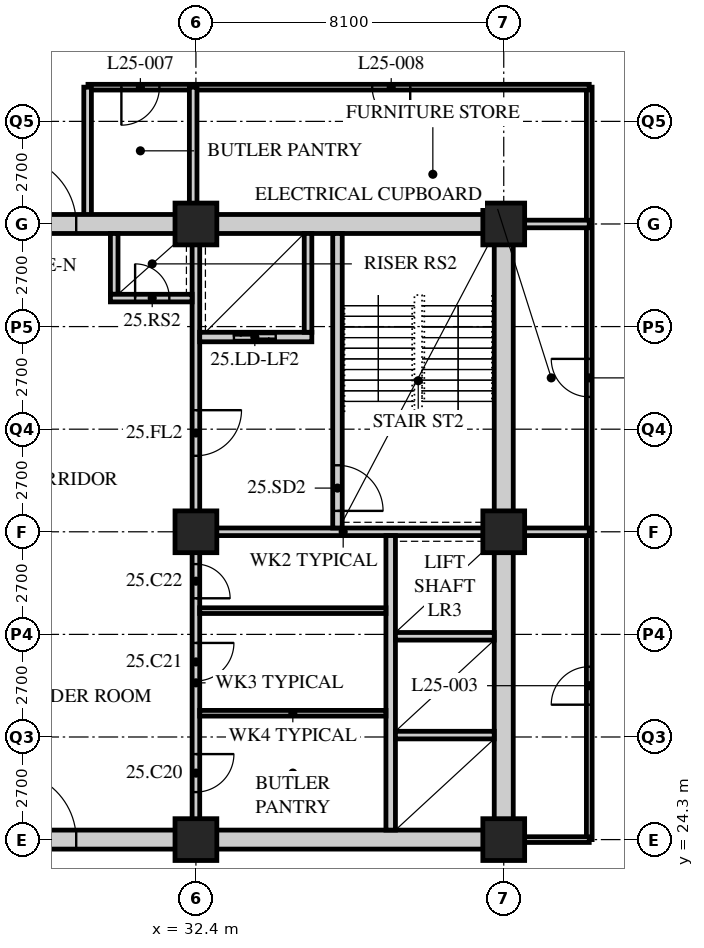
"""IFC4 building model, lengths in metres.
Left out: names, types, materials, properties, quantities, classifications, styles, units other than length and angle.
Written with IfcOpenShell. Run it as: python <this file> out.ifc"""

import sys

from ifc_helpers import new_model, si_unit, direction, frame, frame_2d, origin, origin_2d, place, context, subcontext, project, spatial, rectangle, hollow_rectangle, extrude, element, fill, save


model = new_model("IFC4")
c1 = context("Model", 3, precision=1e-05, world=origin(), true_north=direction((0.0, 1.0)))
c2 = subcontext(c1, "Body", "Model", "MODEL_VIEW")
j1 = project(units=[si_unit("LENGTHUNIT", "METRE"), si_unit("PLANEANGLEUNIT", "RADIAN")], contexts=[c1])
p1 = place(None, origin())
s1 = spatial("IfcSite", under=j1, at=p1, CompositionType="ELEMENT")
p2 = place(p1, origin())
s2 = spatial("IfcBuilding", under=s1, at=p2, CompositionType="ELEMENT")
p3 = place(p2, frame((0.0, 0.0, 103.4)))
s3 = spatial("IfcBuildingStorey", under=s2, at=p3, CompositionType="ELEMENT", Elevation=103.4)
for number, where, z_axis, x_axis in (
    (1, (32.4, 24.3, 0.0), (0.0, 0.0, 1.0), (1.0, 0.0, 0.0)),
    (2, (32.4, 32.4, 0.0), (0.0, 0.0, 1.0), (1.0, 0.0, 0.0)),
    (3, (32.4, 40.5, 0.0), (0.0, 0.0, 1.0), (1.0, 0.0, 0.0)),
    (4, (40.5, 24.3, 0.0), (0.0, 0.0, 1.0), (1.0, 0.0, 0.0)),
    (5, (40.5, 32.4, 0.0), (0.0, 0.0, 1.0), (1.0, 0.0, 0.0)),
    (6, (40.5, 40.5, 0.0), (0.0, 0.0, 1.0), (1.0, 0.0, 0.0)),
):
    element("IfcColumn", number, at=place(p3, frame(where, z_axis=z_axis, x_axis=x_axis)), inside=s3, PredefinedType="COLUMN", context=c2, shape_type="SweptSolid", body=[
        extrude(hollow_rectangle(XDim=1.1, YDim=1.1, WallThickness=0.1, at=origin_2d()), origin(), (0.0, 0.0, 1.0), 3.4),
    ])
p4 = place(p3, frame((42.75, 24.3, 0.0), z_axis=(0.0, 0.0, 1.0), x_axis=(0.0, 1.0, 0.0)))
e7 = element("IfcWall", 7, at=p4, inside=s3, PredefinedType="PARTITIONING", context=c2, shape_type="SweptSolid", body=[
    extrude(rectangle(XDim=19.8, YDim=0.15, at=frame_2d((9.9, 0.0))), origin(), (0.0, 0.0, 1.0), 3.19),
])
p5 = place(p4, frame((3.55, 0.0, 0.0)))
e8 = element("IfcOpeningElement", 8, at=p5, cuts=e7, PredefinedType="OPENING", context=c2, shape_type="SweptSolid", body=[
    extrude(rectangle(XDim=1.0, YDim=2.1, at=frame_2d((0.5, 1.05))), frame((0.0, 0.085, 0.0), z_axis=(0.0, -1.0, 0.0), x_axis=(1.0, 0.0, 0.0)), (0.0, 0.0, 1.0), 0.17),
])
p6 = place(p4, frame((11.65, 0.0, 0.0)))
e9 = element("IfcOpeningElement", 9, at=p6, cuts=e7, PredefinedType="OPENING", context=c2, shape_type="SweptSolid", body=[
    extrude(rectangle(XDim=1.0, YDim=2.1, at=frame_2d((0.5, 1.05))), frame((0.0, 0.085, 0.0), z_axis=(0.0, -1.0, 0.0), x_axis=(1.0, 0.0, 0.0)), (0.0, 0.0, 1.0), 0.17),
])
p7 = place(p3, frame((42.75, 44.1, 0.0), z_axis=(0.0, 0.0, 1.0), x_axis=(-1.0, 0.0, 0.0)))
e10 = element("IfcWall", 10, at=p7, inside=s3, PredefinedType="PARTITIONING", context=c2, shape_type="SweptSolid", body=[
    extrude(rectangle(XDim=13.19, YDim=0.15, at=frame_2d((6.595, 0.0))), origin(), (0.0, 0.0, 1.0), 3.19),
])
p8 = place(p7, frame((11.311, 0.0, 0.0)))
e11 = element("IfcOpeningElement", 11, at=p8, cuts=e10, PredefinedType="OPENING", context=c2, shape_type="SweptSolid", body=[
    extrude(rectangle(XDim=1.0, YDim=2.1, at=frame_2d((0.5, 1.05))), frame((0.0, 0.085, 0.0), z_axis=(0.0, -1.0, 0.0), x_axis=(1.0, 0.0, 0.0)), (0.0, 0.0, 1.0), 0.17),
])
p9 = place(p7, frame((4.711, 0.0, 0.0)))
e12 = element("IfcOpeningElement", 12, at=p9, cuts=e10, PredefinedType="OPENING", context=c2, shape_type="SweptSolid", body=[
    extrude(rectangle(XDim=1.0, YDim=2.1, at=frame_2d((0.5, 1.05))), frame((0.0, 0.085, 0.0), z_axis=(0.0, -1.0, 0.0), x_axis=(1.0, 0.0, 0.0)), (0.0, 0.0, 1.0), 0.17),
])
p10 = place(p3, frame((40.7, 24.3, 0.0), z_axis=(0.0, 0.0, 1.0), x_axis=(1.0, 0.0, 0.0)))
e13 = element("IfcWall", 13, at=p10, inside=s3, PredefinedType="PARTITIONING", context=c2, shape_type="SweptSolid", body=[
    extrude(rectangle(XDim=2.05, YDim=0.15, at=frame_2d((1.025, 0.0))), origin(), (0.0, 0.0, 1.0), 3.19),
])
p11 = place(p3, frame((40.5, 32.4, 0.0), z_axis=(0.0, 0.0, 1.0), x_axis=(1.0, 0.0, 0.0)))
e14 = element("IfcWall", 14, at=p11, inside=s3, PredefinedType="SOLIDWALL", context=c2, shape_type="SweptSolid", body=[
    extrude(rectangle(XDim=2.25, YDim=0.2, at=frame_2d((1.125, 0.0))), origin(), (0.0, 0.0, 1.0), 3.19),
])
p12 = place(p3, frame((32.328, 44.1, 0.0), z_axis=(0.0, 0.0, 1.0), x_axis=(0.0, -1.0, 0.0)))
e15 = element("IfcWall", 15, at=p12, inside=s3, PredefinedType="SOLIDWALL", context=c2, shape_type="SweptSolid", body=[
    extrude(rectangle(XDim=3.6, YDim=0.2, at=frame_2d((1.8, 0.0))), origin(), (0.0, 0.0, 1.0), 2.578),
])
p13 = place(p3, frame((29.55, 40.5, 0.0), z_axis=(0.0, 0.0, 1.0), x_axis=(0.0, 1.0, 0.0)))
e16 = element("IfcWall", 16, at=p13, inside=s3, PredefinedType="SOLIDWALL", context=c2, shape_type="SweptSolid", body=[
    extrude(rectangle(XDim=3.6, YDim=0.2, at=frame_2d((1.8, 0.0))), origin(), (0.0, 0.0, 1.0), 3.19),
])
p14 = place(p3, frame((40.5, 40.5, 0.0), z_axis=(0.0, 0.0, 1.0), x_axis=(1.0, 0.0, 0.0)))
e17 = element("IfcWall", 17, at=p14, inside=s3, PredefinedType="SOLIDWALL", context=c2, shape_type="SweptSolid", body=[
    extrude(rectangle(XDim=2.25, YDim=0.2, at=frame_2d((1.125, 0.0))), origin(), (0.0, 0.0, 1.0), 3.19),
])
p15 = place(p3, frame((15.95, 24.3, 0.0), z_axis=(0.0, 0.0, 1.0), x_axis=(1.0, 0.0, 0.0)))
e18 = element("IfcWall", 18, at=p15, inside=s3, PredefinedType="SOLIDWALL", context=c2, shape_type="SweptSolid", body=[
    extrude(rectangle(XDim=24.8, YDim=0.5, at=frame_2d((12.4, 0.0))), origin(), (0.0, 0.0, 1.0), 2.54),
])
p16 = place(p15, frame((11.5, 0.0, 0.0)))
e19 = element("IfcOpeningElement", 19, at=p16, cuts=e18, PredefinedType="OPENING", context=c2, shape_type="SweptSolid", body=[
    extrude(rectangle(XDim=1.8, YDim=2.4, at=frame_2d((0.9, 1.2))), frame((0.0, 0.26, 0.0), z_axis=(0.0, -1.0, 0.0), x_axis=(1.0, 0.0, 0.0)), (0.0, 0.0, 1.0), 0.52),
])
p17 = place(p3, frame((15.95, 40.5, 0.0), z_axis=(0.0, 0.0, 1.0), x_axis=(1.0, 0.0, 0.0)))
e20 = element("IfcWall", 20, at=p17, inside=s3, PredefinedType="SOLIDWALL", context=c2, shape_type="SweptSolid", body=[
    extrude(rectangle(XDim=24.8, YDim=0.5, at=frame_2d((12.4, 0.0))), origin(), (0.0, 0.0, 1.0), 2.54),
])
p18 = place(p17, frame((11.5, 0.0, 0.0)))
e21 = element("IfcOpeningElement", 21, at=p18, cuts=e20, PredefinedType="OPENING", context=c2, shape_type="SweptSolid", body=[
    extrude(rectangle(XDim=1.8, YDim=2.4, at=frame_2d((0.9, 1.2))), frame((0.0, 0.26, 0.0), z_axis=(0.0, -1.0, 0.0), x_axis=(1.0, 0.0, 0.0)), (0.0, 0.0, 1.0), 0.52),
])
p19 = place(p3, frame((40.5, 24.55, 0.0), z_axis=(0.0, 0.0, 1.0), x_axis=(0.0, 1.0, 0.0)))
e22 = element("IfcWall", 22, at=p19, inside=s3, PredefinedType="SOLIDWALL", context=c2, shape_type="SweptSolid", body=[
    extrude(rectangle(XDim=15.7, YDim=0.5, at=frame_2d((7.85, 0.0))), origin(), (0.0, 0.0, 1.0), 2.578),
])
p20 = place(p3, frame((32.3, 32.4, 0.0), z_axis=(0.0, 0.0, 1.0), x_axis=(1.0, 0.0, 0.0)))
e23 = element("IfcWall", 23, at=p20, inside=s3, PredefinedType="SOLIDWALL", context=c2, shape_type="SweptSolid", body=[
    extrude(rectangle(XDim=7.95, YDim=0.2, at=frame_2d((3.975, 0.0))), origin(), (0.0, 0.0, 1.0), 2.578),
])
p21 = place(p3, frame((32.4, 32.5, 0.0), z_axis=(0.0, 0.0, 1.0), x_axis=(0.0, 1.0, 0.0)))
e24 = element("IfcWall", 24, at=p21, inside=s3, PredefinedType="SOLIDWALL", context=c2, shape_type="SweptSolid", body=[
    extrude(rectangle(XDim=7.75, YDim=0.2, at=frame_2d((3.875, 0.0))), origin(), (0.0, 0.0, 1.0), 2.578),
])
p22 = place(p21, frame((1.9, 0.0, 0.0)))
e25 = element("IfcOpeningElement", 25, at=p22, cuts=e24, PredefinedType="OPENING", context=c2, shape_type="SweptSolid", body=[
    extrude(rectangle(XDim=1.2, YDim=2.1, at=frame_2d((0.6, 1.05))), frame((0.0, 0.11, 0.0), z_axis=(0.0, -1.0, 0.0), x_axis=(1.0, 0.0, 0.0)), (0.0, 0.0, 1.0), 0.22),
])
p23 = place(p3, frame((37.525, 24.55, 0.0), z_axis=(0.0, 0.0, 1.0), x_axis=(0.0, 1.0, 0.0)))
e26 = element("IfcWall", 26, at=p23, inside=s3, PredefinedType="SOLIDWALL", context=c2, shape_type="SweptSolid", body=[
    extrude(rectangle(XDim=7.75, YDim=0.25, at=frame_2d((3.875, 0.0))), origin(), (0.0, 0.0, 1.0), 3.19),
])
for number, where, z_axis, x_axis in (
    (27, (37.65, 27.05, 0.0), (0.0, 0.0, 1.0), (1.0, 0.0, 0.0)),
    (28, (37.65, 29.65, 0.0), (0.0, 0.0, 1.0), (1.0, 0.0, 0.0)),
):
    element("IfcWall", number, at=place(p3, frame(where, z_axis=z_axis, x_axis=x_axis)), inside=s3, PredefinedType="SOLIDWALL", context=c2, shape_type="SweptSolid", body=[
        extrude(rectangle(XDim=2.6, YDim=0.2, at=frame_2d((1.3, 0.0))), origin(), (0.0, 0.0, 1.0), 3.19),
    ])
p24 = place(p3, frame((36.125, 32.5, 0.0), z_axis=(0.0, 0.0, 1.0), x_axis=(0.0, 1.0, 0.0)))
e29 = element("IfcWall", 29, at=p24, inside=s3, PredefinedType="SOLIDWALL", context=c2, shape_type="SweptSolid", body=[
    extrude(rectangle(XDim=7.75, YDim=0.25, at=frame_2d((3.875, 0.0))), origin(), (0.0, 0.0, 1.0), 3.19),
])
p25 = place(p24, frame((0.45, 0.0, 0.0)))
e30 = element("IfcOpeningElement", 30, at=p25, cuts=e29, PredefinedType="OPENING", context=c2, shape_type="SweptSolid", body=[
    extrude(rectangle(XDim=1.2, YDim=2.1, at=frame_2d((0.6, 1.05))), frame((0.0, 0.135, 0.0), z_axis=(0.0, -1.0, 0.0), x_axis=(1.0, 0.0, 0.0)), (0.0, 0.0, 1.0), 0.27),
])
p26 = place(p3, frame((32.5, 37.525, 0.0), z_axis=(0.0, 0.0, 1.0), x_axis=(1.0, 0.0, 0.0)))
e31 = element("IfcWall", 31, at=p26, inside=s3, PredefinedType="SOLIDWALL", context=c2, shape_type="SweptSolid", body=[
    extrude(rectangle(XDim=2.95, YDim=0.25, at=frame_2d((1.475, 0.0))), origin(), (0.0, 0.0, 1.0), 3.19),
])
p27 = place(p26, frame((0.9, 0.0, 0.0)))
e32 = element("IfcOpeningElement", 32, at=p27, cuts=e31, PredefinedType="OPENING", context=c2, shape_type="SweptSolid", body=[
    extrude(rectangle(XDim=1.1, YDim=2.4, at=frame_2d((0.55, 1.2))), frame((0.0, 0.135, 0.0), z_axis=(0.0, -1.0, 0.0), x_axis=(1.0, 0.0, 0.0)), (0.0, 0.0, 1.0), 0.27),
])
p28 = place(p3, frame((35.35, 37.65, 0.0), z_axis=(0.0, 0.0, 1.0), x_axis=(0.0, 1.0, 0.0)))
e33 = element("IfcWall", 33, at=p28, inside=s3, PredefinedType="SOLIDWALL", context=c2, shape_type="SweptSolid", body=[
    extrude(rectangle(XDim=2.6, YDim=0.2, at=frame_2d((1.3, 0.0))), origin(), (0.0, 0.0, 1.0), 3.19),
])
p29 = place(p3, frame((30.25, 38.65, 0.0), z_axis=(0.0, 0.0, 1.0), x_axis=(0.0, 1.0, 0.0)))
e34 = element("IfcWall", 34, at=p29, inside=s3, PredefinedType="SOLIDWALL", context=c2, shape_type="SweptSolid", body=[
    extrude(rectangle(XDim=1.6, YDim=0.2, at=frame_2d((0.8, 0.0))), origin(), (0.0, 0.0, 1.0), 3.19),
])
p30 = place(p3, frame((30.15, 38.55, 0.0), z_axis=(0.0, 0.0, 1.0), x_axis=(1.0, 0.0, 0.0)))
e35 = element("IfcWall", 35, at=p30, inside=s3, PredefinedType="SOLIDWALL", context=c2, shape_type="SweptSolid", body=[
    extrude(rectangle(XDim=2.15, YDim=0.2, at=frame_2d((1.075, 0.0))), origin(), (0.0, 0.0, 1.0), 3.19),
])
p31 = place(p30, frame((0.65, 0.0, 0.0)))
e36 = element("IfcOpeningElement", 36, at=p31, cuts=e35, PredefinedType="OPENING", context=c2, shape_type="SweptSolid", body=[
    extrude(rectangle(XDim=0.9, YDim=2.1, at=frame_2d((0.45, 1.05))), frame((0.0, 0.11, 0.0), z_axis=(0.0, -1.0, 0.0), x_axis=(1.0, 0.0, 0.0)), (0.0, 0.0, 1.0), 0.22),
])
p32 = place(p3, frame((32.4, 24.55, 0.0), z_axis=(0.0, 0.0, 1.0), x_axis=(0.0, 1.0, 0.0)))
e37 = element("IfcWall", 37, at=p32, inside=s3, PredefinedType="PARTITIONING", context=c2, shape_type="SweptSolid", body=[
    extrude(rectangle(XDim=7.75, YDim=0.2, at=frame_2d((3.875, 0.0))), origin(), (0.0, 0.0, 1.0), 2.578),
])
p33 = place(p32, frame((1.0, 0.0, 0.0)))
e38 = element("IfcOpeningElement", 38, at=p33, cuts=e37, PredefinedType="OPENING", context=c2, shape_type="SweptSolid", body=[
    extrude(rectangle(XDim=1.0, YDim=2.1, at=frame_2d((0.5, 1.05))), frame((0.0, 0.11, 0.0), z_axis=(0.0, -1.0, 0.0), x_axis=(1.0, 0.0, 0.0)), (0.0, 0.0, 1.0), 0.22),
])
p34 = place(p32, frame((3.925, 0.0, 0.0)))
e39 = element("IfcOpeningElement", 39, at=p34, cuts=e37, PredefinedType="OPENING", context=c2, shape_type="SweptSolid", body=[
    extrude(rectangle(XDim=1.0, YDim=2.1, at=frame_2d((0.5, 1.05))), frame((0.0, 0.11, 0.0), z_axis=(0.0, -1.0, 0.0), x_axis=(1.0, 0.0, 0.0)), (0.0, 0.0, 1.0), 0.22),
])
p35 = place(p32, frame((6.1, 0.0, 0.0)))
e40 = element("IfcOpeningElement", 40, at=p35, cuts=e37, PredefinedType="OPENING", context=c2, shape_type="SweptSolid", body=[
    extrude(rectangle(XDim=0.9, YDim=2.1, at=frame_2d((0.45, 1.05))), frame((0.0, 0.11, 0.0), z_axis=(0.0, -1.0, 0.0), x_axis=(1.0, 0.0, 0.0)), (0.0, 0.0, 1.0), 0.22),
])
for number, where, z_axis, x_axis in (
    (41, (32.5, 27.625, 0.0), (0.0, 0.0, 1.0), (1.0, 0.0, 0.0)),
    (42, (32.5, 30.325, 0.0), (0.0, 0.0, 1.0), (1.0, 0.0, 0.0)),
):
    element("IfcWall", number, at=place(p3, frame(where, z_axis=z_axis, x_axis=x_axis)), inside=s3, PredefinedType="PARTITIONING", context=c2, shape_type="SweptSolid", body=[
        extrude(rectangle(XDim=4.9, YDim=0.15, at=frame_2d((2.45, 0.0))), origin(), (0.0, 0.0, 1.0), 3.19),
    ])
p36 = place(p5, origin())
e43 = element("IfcDoor", 43, at=p36, inside=s3, OperationType="SINGLE_SWING_LEFT", PredefinedType="DOOR", context=c2, shape_type="SweptSolid", body=[
    extrude(rectangle(XDim=1.0, YDim=2.1, at=frame_2d((0.5, 1.05))), frame((0.0, 0.025, 0.0), z_axis=(0.0, -1.0, 0.0), x_axis=(1.0, 0.0, 0.0)), (0.0, 0.0, 1.0), 0.05),
])
fill(e8, e43)
p37 = place(p6, origin())
e44 = element("IfcDoor", 44, at=p37, inside=s3, OperationType="SINGLE_SWING_RIGHT", PredefinedType="DOOR", context=c2, shape_type="SweptSolid", body=[
    extrude(rectangle(XDim=1.0, YDim=2.1, at=frame_2d((0.5, 1.05))), frame((0.0, 0.025, 0.0), z_axis=(0.0, -1.0, 0.0), x_axis=(1.0, 0.0, 0.0)), (0.0, 0.0, 1.0), 0.05),
])
fill(e9, e44)
p38 = place(p8, origin())
e45 = element("IfcDoor", 45, at=p38, inside=s3, OperationType="SINGLE_SWING_RIGHT", PredefinedType="DOOR", context=c2, shape_type="SweptSolid", body=[
    extrude(rectangle(XDim=1.0, YDim=2.1, at=frame_2d((0.5, 1.05))), frame((0.0, 0.025, 0.0), z_axis=(0.0, -1.0, 0.0), x_axis=(1.0, 0.0, 0.0)), (0.0, 0.0, 1.0), 0.05),
])
fill(e11, e45)
p39 = place(p9, origin())
e46 = element("IfcDoor", 46, at=p39, inside=s3, OperationType="SINGLE_SWING_LEFT", PredefinedType="DOOR", context=c2, shape_type="SweptSolid", body=[
    extrude(rectangle(XDim=1.0, YDim=2.1, at=frame_2d((0.5, 1.05))), frame((0.0, 0.025, 0.0), z_axis=(0.0, -1.0, 0.0), x_axis=(1.0, 0.0, 0.0)), (0.0, 0.0, 1.0), 0.05),
])
fill(e12, e46)
p40 = place(p33, origin())
e47 = element("IfcDoor", 47, at=p40, inside=s3, OperationType="SINGLE_SWING_LEFT", PredefinedType="DOOR", context=c2, shape_type="SweptSolid", body=[
    extrude(rectangle(XDim=1.0, YDim=2.1, at=frame_2d((0.5, 1.05))), frame((0.0, 0.025, 0.0), z_axis=(0.0, -1.0, 0.0), x_axis=(1.0, 0.0, 0.0)), (0.0, 0.0, 1.0), 0.05),
])
fill(e38, e47)
p41 = place(p34, origin())
e48 = element("IfcDoor", 48, at=p41, inside=s3, OperationType="SINGLE_SWING_LEFT", PredefinedType="DOOR", context=c2, shape_type="SweptSolid", body=[
    extrude(rectangle(XDim=1.0, YDim=2.1, at=frame_2d((0.5, 1.05))), frame((0.0, 0.025, 0.0), z_axis=(0.0, -1.0, 0.0), x_axis=(1.0, 0.0, 0.0)), (0.0, 0.0, 1.0), 0.05),
])
fill(e39, e48)
p42 = place(p35, origin())
e49 = element("IfcDoor", 49, at=p42, inside=s3, OperationType="SINGLE_SWING_RIGHT", PredefinedType="DOOR", context=c2, shape_type="SweptSolid", body=[
    extrude(rectangle(XDim=0.9, YDim=2.1, at=frame_2d((0.45, 1.05))), frame((0.0, 0.025, 0.0), z_axis=(0.0, -1.0, 0.0), x_axis=(1.0, 0.0, 0.0)), (0.0, 0.0, 1.0), 0.05),
])
fill(e40, e49)
p43 = place(p25, origin())
e50 = element("IfcDoor", 50, at=p43, inside=s3, OperationType="SINGLE_SWING_RIGHT", PredefinedType="DOOR", context=c2, shape_type="SweptSolid", body=[
    extrude(rectangle(XDim=1.2, YDim=2.1, at=frame_2d((0.6, 1.05))), frame((0.0, 0.025, 0.0), z_axis=(0.0, -1.0, 0.0), x_axis=(1.0, 0.0, 0.0)), (0.0, 0.0, 1.0), 0.05),
])
fill(e30, e50)
p44 = place(p22, origin())
e51 = element("IfcDoor", 51, at=p44, inside=s3, OperationType="SINGLE_SWING_LEFT", PredefinedType="DOOR", context=c2, shape_type="SweptSolid", body=[
    extrude(rectangle(XDim=1.2, YDim=2.1, at=frame_2d((0.6, 1.05))), frame((0.0, 0.025, 0.0), z_axis=(0.0, -1.0, 0.0), x_axis=(1.0, 0.0, 0.0)), (0.0, 0.0, 1.0), 0.05),
])
fill(e25, e51)
p45 = place(p31, origin())
e52 = element("IfcDoor", 52, at=p45, inside=s3, OperationType="SINGLE_SWING_LEFT", PredefinedType="DOOR", context=c2, shape_type="SweptSolid", body=[
    extrude(rectangle(XDim=0.9, YDim=2.1, at=frame_2d((0.45, 1.05))), frame((0.0, 0.025, 0.0), z_axis=(0.0, -1.0, 0.0), x_axis=(1.0, 0.0, 0.0)), (0.0, 0.0, 1.0), 0.05),
])
fill(e36, e52)
p46 = place(p27, origin())
e53 = element("IfcDoor", 53, at=p46, inside=s3, OperationType="DOUBLE_DOOR_SLIDING", PredefinedType="DOOR", context=c2, shape_type="SweptSolid", body=[
    extrude(rectangle(XDim=1.1, YDim=2.4, at=frame_2d((0.55, 1.2))), frame((0.0, 0.025, 0.0), z_axis=(0.0, -1.0, 0.0), x_axis=(1.0, 0.0, 0.0)), (0.0, 0.0, 1.0), 0.05),
])
fill(e32, e53)
p47 = place(p16, origin())
e54 = element("IfcDoor", 54, at=p47, inside=s3, OperationType="DOUBLE_DOOR_SINGLE_SWING", PredefinedType="DOOR", context=c2, shape_type="SweptSolid", body=[
    extrude(rectangle(XDim=1.8, YDim=2.4, at=frame_2d((0.9, 1.2))), frame((0.0, 0.025, 0.0), z_axis=(0.0, -1.0, 0.0), x_axis=(1.0, 0.0, 0.0)), (0.0, 0.0, 1.0), 0.05),
])
fill(e19, e54)
p48 = place(p18, origin())
e55 = element("IfcDoor", 55, at=p48, inside=s3, OperationType="DOUBLE_DOOR_SINGLE_SWING", PredefinedType="DOOR", context=c2, shape_type="SweptSolid", body=[
    extrude(rectangle(XDim=1.8, YDim=2.4, at=frame_2d((0.9, 1.2))), frame((0.0, 0.025, 0.0), z_axis=(0.0, -1.0, 0.0), x_axis=(1.0, 0.0, 0.0)), (0.0, 0.0, 1.0), 0.05),
])
fill(e21, e55)
save(model, sys.argv[1])
